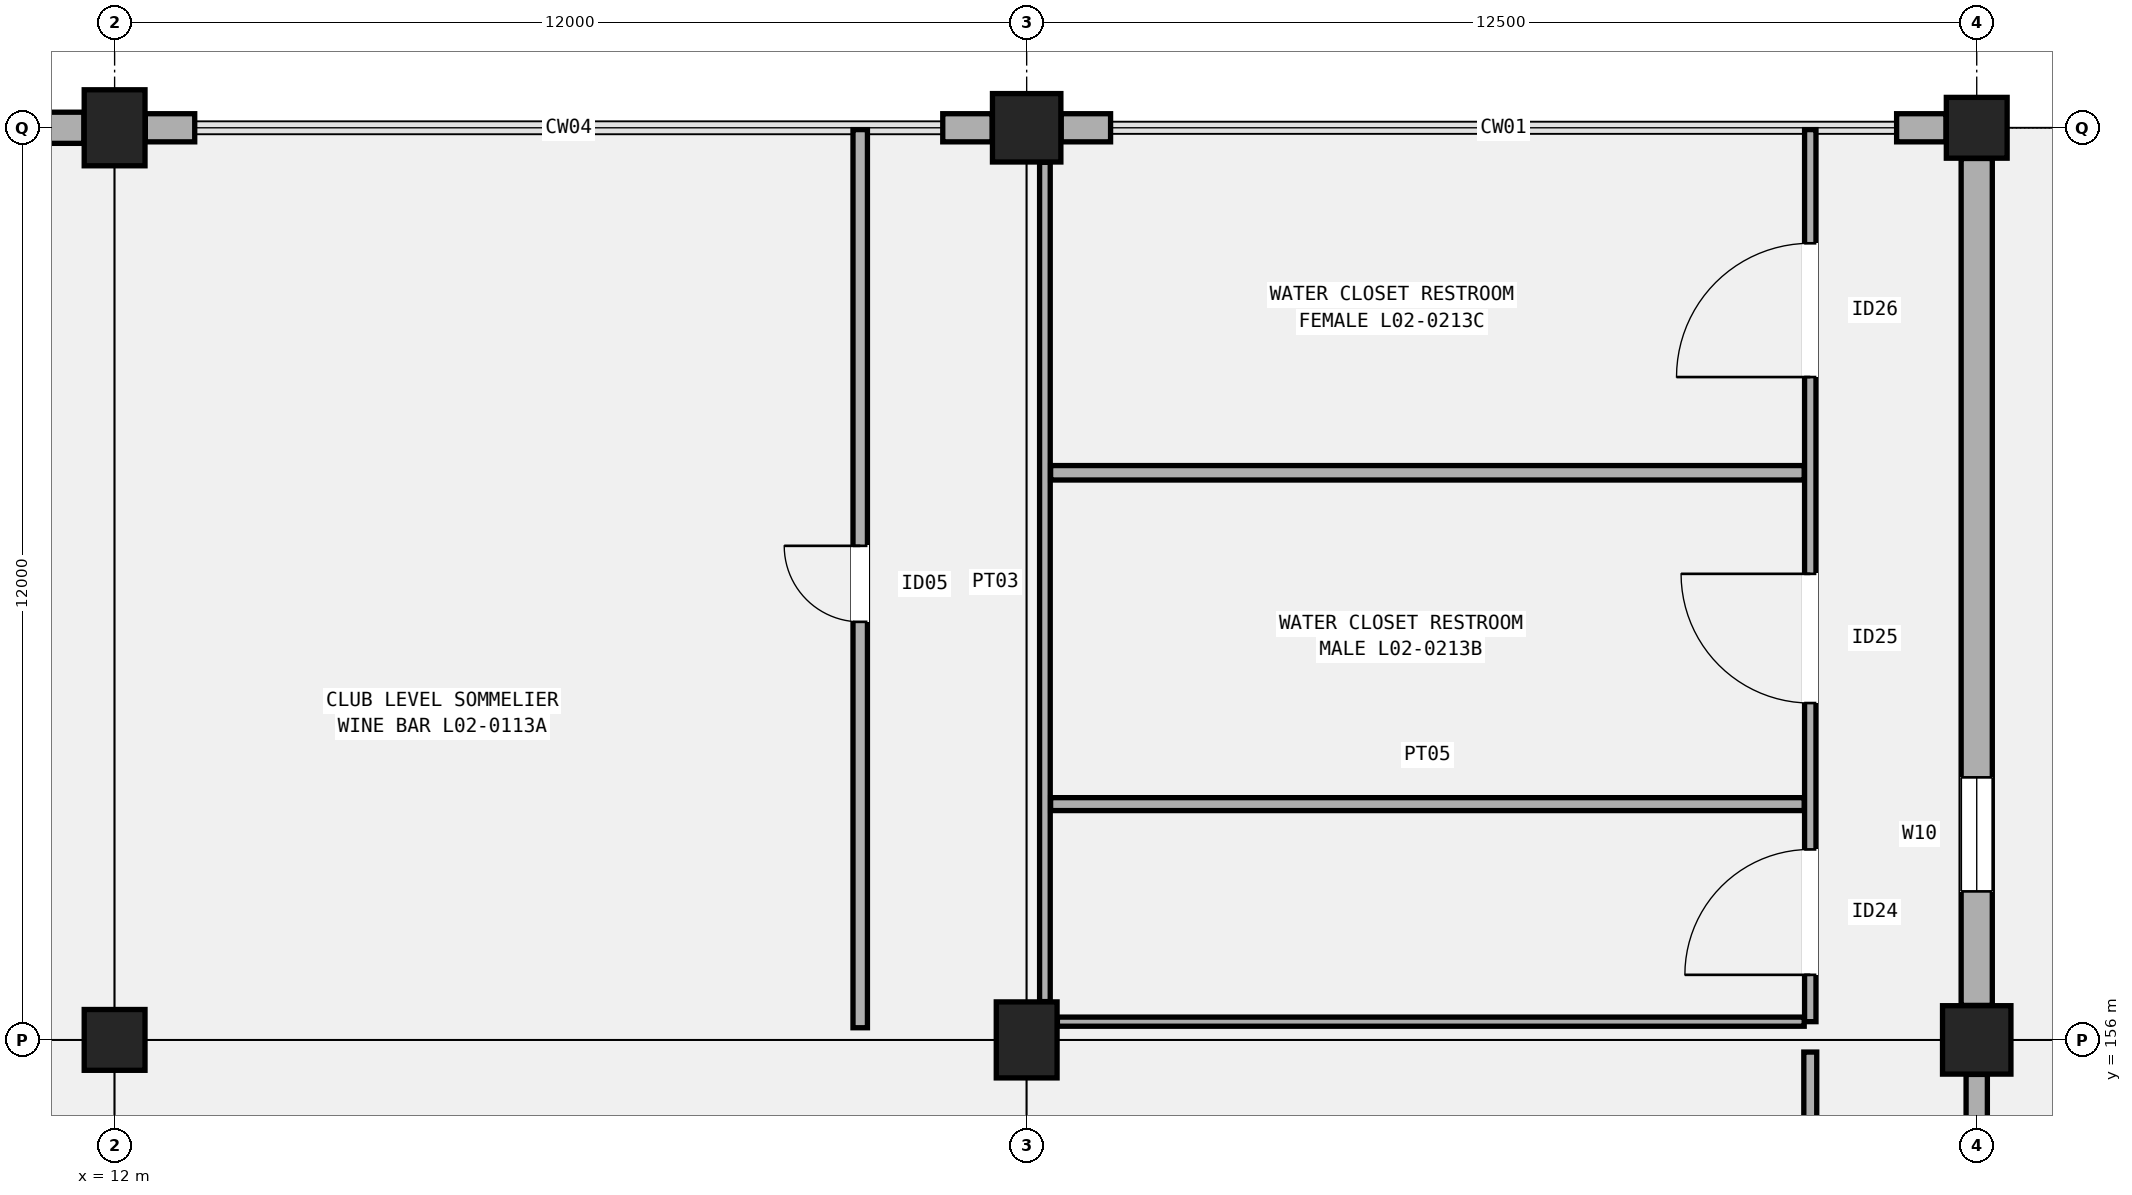
"""IFC4 building model, lengths in metres.
Left out: names, types, materials, properties, quantities, classifications, styles, units other than length and angle.
Written with IfcOpenShell. Run it as: python <this file> out.ifc"""

import sys

from ifc_helpers import new_model, si_unit, direction, frame, frame_2d, origin, origin_2d, place, context, subcontext, project, spatial, rectangle, extrude, element, fill, save


model = new_model("IFC4")
c1 = context("Model", 3, precision=1e-05, world=origin(), true_north=direction((0.0, 1.0)))
c2 = subcontext(c1, "Body", "Model", "MODEL_VIEW")
j1 = project(units=[si_unit("LENGTHUNIT", "METRE"), si_unit("PLANEANGLEUNIT", "RADIAN")], contexts=[c1])
p1 = place(None, origin())
s1 = spatial("IfcSite", under=j1, at=p1, CompositionType="ELEMENT")
p2 = place(p1, origin())
s2 = spatial("IfcBuilding", under=s1, at=p2, CompositionType="ELEMENT")
p3 = place(p2, frame((0.0, 0.0, 10.2)))
s3 = spatial("IfcBuildingStorey", under=s2, at=p3, CompositionType="ELEMENT", Elevation=10.2)
p4 = place(p3, frame((12.0, 156.0, 0.0), z_axis=(0.0, 0.0, 1.0), x_axis=(1.0, 0.0, 0.0)))
e1 = element("IfcColumn", 1, at=p4, inside=s3, PredefinedType="COLUMN", context=c2, shape_type="SweptSolid", body=[
    extrude(rectangle(XDim=0.8, YDim=0.8, at=origin_2d()), origin(), (0.0, 0.0, 1.0), 5.1),
])
for number, where, z_axis, x_axis in (
    (2, (12.0, 168.0, 0.0), (0.0, 0.0, 1.0), (1.0, 0.0, 0.0)),
    (3, (24.0, 156.0, 0.0), (0.0, 0.0, 1.0), (1.0, 0.0, 0.0)),
):
    element("IfcColumn", number, at=place(p3, frame(where, z_axis=z_axis, x_axis=x_axis)), inside=s3, PredefinedType="COLUMN", context=c2, shape_type="SweptSolid", body=[
        extrude(rectangle(XDim=0.8, YDim=1.0, at=origin_2d()), origin(), (0.0, 0.0, 1.0), 5.1),
    ])
for number, where, z_axis, x_axis in (
    (4, (24.0, 168.0, 0.0), (0.0, 0.0, 1.0), (1.0, 0.0, 0.0)),
    (5, (36.5, 156.0, 0.0), (0.0, 0.0, 1.0), (1.0, 0.0, 0.0)),
):
    element("IfcColumn", number, at=place(p3, frame(where, z_axis=z_axis, x_axis=x_axis)), inside=s3, PredefinedType="COLUMN", context=c2, shape_type="SweptSolid", body=[
        extrude(rectangle(XDim=0.9, YDim=0.9, at=origin_2d()), origin(), (0.0, 0.0, 1.0), 5.1),
    ])
p5 = place(p3, frame((36.5, 168.0, 0.0), z_axis=(0.0, 0.0, 1.0), x_axis=(1.0, 0.0, 0.0)))
e6 = element("IfcColumn", 6, at=p5, inside=s3, PredefinedType="COLUMN", context=c2, shape_type="SweptSolid", body=[
    extrude(rectangle(XDim=0.8, YDim=0.8, at=origin_2d()), origin(), (0.0, 0.0, 1.0), 5.1),
])
p6 = place(p3, frame((0.404, 168.0, 0.0), z_axis=(0.0, 0.0, 1.0), x_axis=(1.0, 0.0, 0.0)))
e7 = element("IfcWall", 7, at=p6, inside=s3, PredefinedType="SOLIDWALL", context=c2, shape_type="SweptSolid", body=[
    extrude(rectangle(XDim=11.192, YDim=0.41, at=frame_2d((5.596, 0.0))), origin(), (0.0, 0.0, 1.0), 4.22),
])
p7 = place(p6, frame((1.5, 0.0, 0.95)))
e8 = element("IfcOpeningElement", 8, at=p7, cuts=e7, PredefinedType="OPENING", context=c2, shape_type="SweptSolid", body=[
    extrude(rectangle(XDim=0.9, YDim=2.1, at=frame_2d((0.45, 1.05))), frame((0.0, 0.215, 0.0), z_axis=(0.0, -1.0, 0.0), x_axis=(1.0, 0.0, 0.0)), (0.0, 0.0, 1.0), 0.43),
])
for number, where, z_axis, x_axis in (
    (9, (12.404, 168.0, 0.0), (0.0, 0.0, 1.0), (1.0, 0.0, 0.0)),
    (10, (22.896, 168.0, 0.0), (0.0, 0.0, 1.0), (1.0, 0.0, 0.0)),
):
    element("IfcWall", number, at=place(p3, frame(where, z_axis=z_axis, x_axis=x_axis)), inside=s3, PredefinedType="SOLIDWALL", context=c2, shape_type="SweptSolid", body=[
        extrude(rectangle(XDim=0.65, YDim=0.37, at=frame_2d((0.325, 0.0))), origin(), (0.0, 0.0, 1.0), 4.02),
    ])
p8 = place(p3, frame((36.5, 144.504, 0.0), z_axis=(0.0, 0.0, 1.0), x_axis=(0.0, 1.0, 0.0)))
e11 = element("IfcWall", 11, at=p8, inside=s3, PredefinedType="SOLIDWALL", context=c2, shape_type="SweptSolid", body=[
    extrude(rectangle(XDim=11.042, YDim=0.28, at=frame_2d((5.521, 0.0))), origin(), (0.0, 0.0, 1.0), 4.02),
])
p9 = place(p8, frame((1.5, 0.0, 0.95)))
e12 = element("IfcOpeningElement", 12, at=p9, cuts=e11, PredefinedType="OPENING", context=c2, shape_type="SweptSolid", body=[
    extrude(rectangle(XDim=1.5, YDim=1.8, at=frame_2d((0.75, 0.9))), frame((0.0, 0.15, 0.0), z_axis=(0.0, -1.0, 0.0), x_axis=(1.0, 0.0, 0.0)), (0.0, 0.0, 1.0), 0.3),
])
for number, where, z_axis, x_axis in (
    (13, (24.454, 168.0, 0.0), (0.0, 0.0, 1.0), (1.0, 0.0, 0.0)),
    (14, (35.446, 168.0, 0.0), (0.0, 0.0, 1.0), (1.0, 0.0, 0.0)),
):
    element("IfcWall", number, at=place(p3, frame(where, z_axis=z_axis, x_axis=x_axis)), inside=s3, PredefinedType="SOLIDWALL", context=c2, shape_type="SweptSolid", body=[
        extrude(rectangle(XDim=0.65, YDim=0.37, at=frame_2d((0.325, 0.0))), origin(), (0.0, 0.0, 1.0), 4.12),
    ])
p10 = place(p3, frame((36.5, 156.454, 0.0), z_axis=(0.0, 0.0, 1.0), x_axis=(0.0, 1.0, 0.0)))
e15 = element("IfcWall", 15, at=p10, inside=s3, PredefinedType="SOLIDWALL", context=c2, shape_type="SweptSolid", body=[
    extrude(rectangle(XDim=11.142, YDim=0.41, at=frame_2d((5.571, 0.0))), origin(), (0.0, 0.0, 1.0), 4.12),
])
p11 = place(p10, frame((1.5, 0.0, 0.95)))
e16 = element("IfcOpeningElement", 16, at=p11, cuts=e15, PredefinedType="OPENING", context=c2, shape_type="SweptSolid", body=[
    extrude(rectangle(XDim=1.5, YDim=2.25, at=frame_2d((0.75, 1.125))), frame((0.0, 0.215, 0.0), z_axis=(0.0, -1.0, 0.0), x_axis=(1.0, 0.0, 0.0)), (0.0, 0.0, 1.0), 0.43),
])
p12 = place(p3, frame((21.81, 156.16, 0.0), z_axis=(0.0, 0.0, 1.0), x_axis=(0.0, 1.0, 0.0)))
e17 = element("IfcWall", 17, at=p12, inside=s3, PredefinedType="PARTITIONING", context=c2, shape_type="SweptSolid", body=[
    extrude(rectangle(XDim=11.816, YDim=0.19, at=frame_2d((5.908, 0.0))), origin(), (0.0, 0.0, 1.0), 4.22),
])
p13 = place(p12, frame((5.34, 0.0, 0.0)))
e18 = element("IfcOpeningElement", 18, at=p13, cuts=e17, PredefinedType="OPENING", context=c2, shape_type="SweptSolid", body=[
    extrude(rectangle(XDim=1.0, YDim=2.14, at=frame_2d((0.5, 1.07))), frame((0.0, 0.105, 0.0), z_axis=(0.0, -1.0, 0.0), x_axis=(1.0, 0.0, 0.0)), (0.0, 0.0, 1.0), 0.21),
])
p14 = place(p3, frame((34.31, 146.12, 0.0), z_axis=(0.0, 0.0, 1.0), x_axis=(0.0, 1.0, 0.0)))
e19 = element("IfcWall", 19, at=p14, inside=s3, PredefinedType="PARTITIONING", context=c2, shape_type="SweptSolid", body=[
    extrude(rectangle(XDim=9.72, YDim=0.17, at=frame_2d((4.86, 0.0))), origin(), (0.0, 0.0, 1.0), 4.22),
])
p15 = place(p14, frame((1.464, 0.0, 0.0)))
e20 = element("IfcOpeningElement", 20, at=p15, cuts=e19, PredefinedType="OPENING", context=c2, shape_type="SweptSolid", body=[
    extrude(rectangle(XDim=1.56, YDim=2.26, at=frame_2d((0.78, 1.13))), frame((0.0, 0.095, 0.0), z_axis=(0.0, -1.0, 0.0), x_axis=(1.0, 0.0, 0.0)), (0.0, 0.0, 1.0), 0.19),
])
p16 = place(p14, frame((6.384, 0.0, 0.0)))
e21 = element("IfcOpeningElement", 21, at=p16, cuts=e19, PredefinedType="OPENING", context=c2, shape_type="SweptSolid", body=[
    extrude(rectangle(XDim=1.6, YDim=2.3, at=frame_2d((0.8, 1.15))), frame((0.0, 0.095, 0.0), z_axis=(0.0, -1.0, 0.0), x_axis=(1.0, 0.0, 0.0)), (0.0, 0.0, 1.0), 0.19),
])
p17 = place(p3, frame((34.31, 156.24, 0.0), z_axis=(0.0, 0.0, 1.0), x_axis=(0.0, 1.0, 0.0)))
e22 = element("IfcWall", 22, at=p17, inside=s3, PredefinedType="PARTITIONING", context=c2, shape_type="SweptSolid", body=[
    extrude(rectangle(XDim=11.736, YDim=0.15, at=frame_2d((5.868, 0.0))), origin(), (0.0, 0.0, 1.0), 4.22),
])
p18 = place(p17, frame((0.616, 0.0, 0.0)))
e23 = element("IfcOpeningElement", 23, at=p18, cuts=e22, PredefinedType="OPENING", context=c2, shape_type="SweptSolid", body=[
    extrude(rectangle(XDim=1.65, YDim=2.28, at=frame_2d((0.825, 1.14))), frame((0.0, 0.085, 0.0), z_axis=(0.0, -1.0, 0.0), x_axis=(1.0, 0.0, 0.0)), (0.0, 0.0, 1.0), 0.17),
])
p19 = place(p17, frame((4.192, 0.0, 0.0)))
e24 = element("IfcOpeningElement", 24, at=p19, cuts=e22, PredefinedType="OPENING", context=c2, shape_type="SweptSolid", body=[
    extrude(rectangle(XDim=1.7, YDim=2.32, at=frame_2d((0.85, 1.16))), frame((0.0, 0.085, 0.0), z_axis=(0.0, -1.0, 0.0), x_axis=(1.0, 0.0, 0.0)), (0.0, 0.0, 1.0), 0.17),
])
p20 = place(p17, frame((8.48, 0.0, 0.0)))
e25 = element("IfcOpeningElement", 25, at=p20, cuts=e22, PredefinedType="OPENING", context=c2, shape_type="SweptSolid", body=[
    extrude(rectangle(XDim=1.76, YDim=2.3, at=frame_2d((0.88, 1.15))), frame((0.0, 0.085, 0.0), z_axis=(0.0, -1.0, 0.0), x_axis=(1.0, 0.0, 0.0)), (0.0, 0.0, 1.0), 0.17),
])
p21 = place(p3, frame((24.404, 156.24, 0.0), z_axis=(0.0, 0.0, 1.0), x_axis=(1.0, 0.0, 0.0)))
e26 = element("IfcWall", 26, at=p21, inside=s3, PredefinedType="PARTITIONING", context=c2, shape_type="SweptSolid", body=[
    extrude(rectangle(XDim=9.826, YDim=0.12, at=frame_2d((4.913, 0.0))), origin(), (0.0, 0.0, 1.0), 3.98),
])
p22 = place(p3, frame((24.24, 156.504, 0.0), z_axis=(0.0, 0.0, 1.0), x_axis=(0.0, 1.0, 0.0)))
e27 = element("IfcWall", 27, at=p22, inside=s3, PredefinedType="PARTITIONING", context=c2, shape_type="SweptSolid", body=[
    extrude(rectangle(XDim=11.042, YDim=0.14, at=frame_2d((5.521, 0.0))), origin(), (0.0, 0.0, 1.0), 3.98),
])
p23 = place(p3, frame((24.315, 159.102, 0.0), z_axis=(0.0, 0.0, 1.0), x_axis=(1.0, 0.0, 0.0)))
e28 = element("IfcWall", 28, at=p23, inside=s3, PredefinedType="PARTITIONING", context=c2, shape_type="SweptSolid", body=[
    extrude(rectangle(XDim=9.915, YDim=0.17, at=frame_2d((4.958, 0.0))), origin(), (0.0, 0.0, 1.0), 4.22),
])
p24 = place(p3, frame((24.315, 163.461, 0.0), z_axis=(0.0, 0.0, 1.0), x_axis=(1.0, 0.0, 0.0)))
e29 = element("IfcWall", 29, at=p24, inside=s3, PredefinedType="PARTITIONING", context=c2, shape_type="SweptSolid", body=[
    extrude(rectangle(XDim=9.915, YDim=0.19, at=frame_2d((4.958, 0.0))), origin(), (0.0, 0.0, 1.0), 4.22),
])
p25 = place(p11, origin())
e30 = element("IfcWindow", 30, at=p25, inside=s3, PartitioningType="SINGLE_PANEL", PredefinedType="WINDOW", context=c2, shape_type="SweptSolid", body=[
    extrude(rectangle(XDim=1.5, YDim=2.25, at=frame_2d((0.75, 1.125))), frame((0.0, 0.03, 0.0), z_axis=(0.0, -1.0, 0.0), x_axis=(1.0, 0.0, 0.0)), (0.0, 0.0, 1.0), 0.06),
])
fill(e16, e30)
p26 = place(p13, origin())
e31 = element("IfcDoor", 31, at=p26, inside=s3, OperationType="SINGLE_SWING_RIGHT", PredefinedType="DOOR", context=c2, shape_type="SweptSolid", body=[
    extrude(rectangle(XDim=1.0, YDim=2.14, at=frame_2d((0.5, 1.07))), frame((0.0, 0.025, 0.0), z_axis=(0.0, -1.0, 0.0), x_axis=(1.0, 0.0, 0.0)), (0.0, 0.0, 1.0), 0.05),
])
fill(e18, e31)
p27 = place(p18, origin())
e32 = element("IfcDoor", 32, at=p27, inside=s3, OperationType="SINGLE_SWING_LEFT", PredefinedType="DOOR", context=c2, shape_type="SweptSolid", body=[
    extrude(rectangle(XDim=1.65, YDim=2.28, at=frame_2d((0.825, 1.14))), frame((0.0, 0.025, 0.0), z_axis=(0.0, -1.0, 0.0), x_axis=(1.0, 0.0, 0.0)), (0.0, 0.0, 1.0), 0.05),
])
fill(e23, e32)
p28 = place(p19, origin())
e33 = element("IfcDoor", 33, at=p28, inside=s3, OperationType="SINGLE_SWING_RIGHT", PredefinedType="DOOR", context=c2, shape_type="SweptSolid", body=[
    extrude(rectangle(XDim=1.7, YDim=2.32, at=frame_2d((0.85, 1.16))), frame((0.0, 0.025, 0.0), z_axis=(0.0, -1.0, 0.0), x_axis=(1.0, 0.0, 0.0)), (0.0, 0.0, 1.0), 0.05),
])
fill(e24, e33)
p29 = place(p20, origin())
e34 = element("IfcDoor", 34, at=p29, inside=s3, OperationType="SINGLE_SWING_LEFT", PredefinedType="DOOR", context=c2, shape_type="SweptSolid", body=[
    extrude(rectangle(XDim=1.76, YDim=2.3, at=frame_2d((0.88, 1.15))), frame((0.0, 0.025, 0.0), z_axis=(0.0, -1.0, 0.0), x_axis=(1.0, 0.0, 0.0)), (0.0, 0.0, 1.0), 0.05),
])
fill(e25, e34)
save(model, sys.argv[1])
